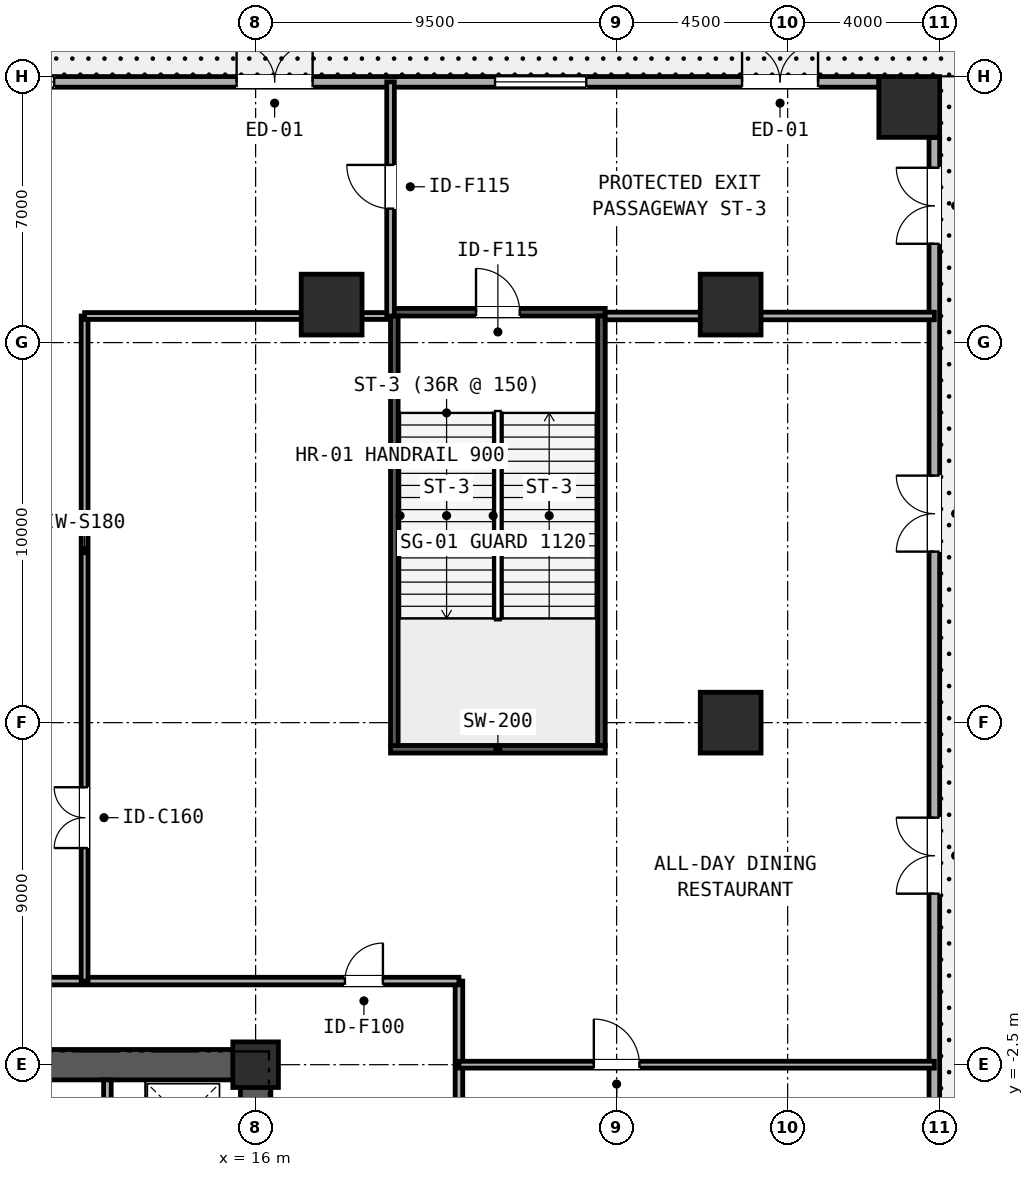
"""IFC4 building model, lengths in metres.
Left out: names, types, materials, properties, quantities, classifications, styles, units other than length and angle.
Written with IfcOpenShell. Run it as: python <this file> out.ifc"""

import sys

from ifc_helpers import new_model, si_unit, direction, frame, frame_2d, origin, origin_2d, place, context, subcontext, project, spatial, rectangle, extrude, element, fill, save


model = new_model("IFC4")
c1 = context("Model", 3, precision=1e-05, world=origin(), true_north=direction((0.0, 1.0)))
c2 = subcontext(c1, "Body", "Model", "MODEL_VIEW")
j1 = project(units=[si_unit("LENGTHUNIT", "METRE"), si_unit("PLANEANGLEUNIT", "RADIAN")], contexts=[c1])
p1 = place(None, origin())
s1 = spatial("IfcSite", under=j1, at=p1, CompositionType="ELEMENT")
p2 = place(p1, origin())
s2 = spatial("IfcBuilding", under=s1, at=p2, CompositionType="ELEMENT")
p3 = place(p2, origin())
s3 = spatial("IfcBuildingStorey", under=s2, at=p3, CompositionType="ELEMENT", Elevation=0.0)
p4 = place(p3, frame((-16.4, -2.5, 0.0), z_axis=(0.0, 0.0, 1.0), x_axis=(1.0, 0.0, 0.0)))
e1 = element("IfcWall", 1, at=p4, inside=s3, PredefinedType="SHEAR", context=c2, shape_type="SweptSolid", body=[
    extrude(rectangle(XDim=32.8, YDim=0.8, at=frame_2d((16.4, 0.0))), origin(), (0.0, 0.0, 1.0), 4.82),
])
p5 = place(p4, frame((6.025, 0.0, 0.0)))
e2 = element("IfcOpeningElement", 2, at=p5, cuts=e1, PredefinedType="OPENING", context=c2, shape_type="SweptSolid", body=[
    extrude(rectangle(XDim=1.15, YDim=2.0, at=frame_2d((0.575, 1.0))), frame((0.0, 0.41, 0.0), z_axis=(0.0, -1.0, 0.0), x_axis=(1.0, 0.0, 0.0)), (0.0, 0.0, 1.0), 0.82),
])
p6 = place(p4, frame((15.6, 0.0, 0.0)))
e3 = element("IfcOpeningElement", 3, at=p6, cuts=e1, PredefinedType="OPENING", context=c2, shape_type="SweptSolid", body=[
    extrude(rectangle(XDim=1.6, YDim=2.0, at=frame_2d((0.8, 1.0))), frame((0.0, 0.41, 0.0), z_axis=(0.0, -1.0, 0.0), x_axis=(1.0, 0.0, 0.0)), (0.0, 0.0, 1.0), 0.82),
])
p7 = place(p4, frame((25.625, 0.0, 0.0)))
e4 = element("IfcOpeningElement", 4, at=p7, cuts=e1, PredefinedType="OPENING", context=c2, shape_type="SweptSolid", body=[
    extrude(rectangle(XDim=1.15, YDim=2.0, at=frame_2d((0.575, 1.0))), frame((0.0, 0.41, 0.0), z_axis=(0.0, -1.0, 0.0), x_axis=(1.0, 0.0, 0.0)), (0.0, 0.0, 1.0), 0.82),
])
p8 = place(p3, frame((16.0, -12.6, 0.0), z_axis=(0.0, 0.0, 1.0), x_axis=(0.0, 1.0, 0.0)))
e5 = element("IfcWall", 5, at=p8, inside=s3, PredefinedType="SHEAR", context=c2, shape_type="SweptSolid", body=[
    extrude(rectangle(XDim=9.7, YDim=0.8, at=frame_2d((4.85, 0.0))), origin(), (0.0, 0.0, 1.0), 4.82),
])
p9 = place(p3, frame((19.55, 5.8, 0.0), z_axis=(0.0, 0.0, 1.0), x_axis=(1.0, 0.0, 0.0)))
e6 = element("IfcWall", 6, at=p9, inside=s3, PredefinedType="SOLIDWALL", context=c2, shape_type="SweptSolid", body=[
    extrude(rectangle(XDim=5.65, YDim=0.2, at=frame_2d((2.825, 0.0))), origin(), (0.0, 0.0, 1.0), 5.1),
])
p10 = place(p3, frame((19.55, 17.3, 0.0), z_axis=(0.0, 0.0, 1.0), x_axis=(1.0, 0.0, 0.0)))
e7 = element("IfcWall", 7, at=p10, inside=s3, PredefinedType="SOLIDWALL", context=c2, shape_type="SweptSolid", body=[
    extrude(rectangle(XDim=5.65, YDim=0.2, at=frame_2d((2.825, 0.0))), origin(), (0.0, 0.0, 1.0), 5.1),
])
p11 = place(p10, frame((2.25, 0.0, 0.0)))
e8 = element("IfcOpeningElement", 8, at=p11, cuts=e7, PredefinedType="OPENING", context=c2, shape_type="SweptSolid", body=[
    extrude(rectangle(XDim=1.15, YDim=2.2, at=frame_2d((0.575, 1.1))), frame((0.0, 0.11, 0.0), z_axis=(0.0, -1.0, 0.0), x_axis=(1.0, 0.0, 0.0)), (0.0, 0.0, 1.0), 0.22),
])
for number, where, z_axis, x_axis in (
    (9, (19.65, 5.9, 0.0), (0.0, 0.0, 1.0), (0.0, 1.0, 0.0)),
    (10, (25.1, 5.9, 0.0), (0.0, 0.0, 1.0), (0.0, 1.0, 0.0)),
):
    element("IfcWall", number, at=place(p3, frame(where, z_axis=z_axis, x_axis=x_axis)), inside=s3, PredefinedType="SOLIDWALL", context=c2, shape_type="SweptSolid", body=[
        extrude(rectangle(XDim=11.3, YDim=0.2, at=frame_2d((5.65, 0.0))), origin(), (0.0, 0.0, 1.0), 5.1),
    ])
p12 = place(p3, frame((16.0, -2.5, 0.0), z_axis=(0.0, 0.0, 1.0), x_axis=(1.0, 0.0, 0.0)))
e11 = element("IfcColumn", 11, at=p12, inside=s3, PredefinedType="COLUMN", context=c2, shape_type="SweptSolid", body=[
    extrude(rectangle(XDim=1.2, YDim=1.2, at=origin_2d()), origin(), (0.0, 0.0, 1.0), 5.4),
])
for number, where, z_axis, x_axis in (
    (12, (33.2, 22.7, 0.0), (0.0, 0.0, 1.0), (1.0, 0.0, 0.0)),
    (13, (28.5, 6.5, 0.0), (0.0, 0.0, 1.0), (1.0, 0.0, 0.0)),
    (14, (18.0, 17.5, 0.0), (0.0, 0.0, 1.0), (1.0, 0.0, 0.0)),
    (15, (28.5, 17.5, 0.0), (0.0, 0.0, 1.0), (1.0, 0.0, 0.0)),
):
    element("IfcColumn", number, at=place(p3, frame(where, z_axis=z_axis, x_axis=x_axis)), inside=s3, PredefinedType="COLUMN", context=c2, shape_type="SweptSolid", body=[
        extrude(rectangle(XDim=1.6, YDim=1.6, at=origin_2d()), origin(), (0.0, 0.0, 1.0), 5.4),
    ])
p13 = place(p3, frame((-32.4, 23.36, 0.0), z_axis=(0.0, 0.0, 1.0), x_axis=(1.0, 0.0, 0.0)))
e16 = element("IfcWall", 16, at=p13, inside=s3, PredefinedType="STANDARD", context=c2, shape_type="SweptSolid", body=[
    extrude(rectangle(XDim=64.8, YDim=0.28, at=frame_2d((32.4, 0.0))), origin(), (0.0, 0.0, 1.0), 5.1),
])
p14 = place(p13, frame((8.6, 0.0, 0.0)))
e17 = element("IfcOpeningElement", 17, at=p14, cuts=e16, PredefinedType="OPENING", context=c2, shape_type="SweptSolid", body=[
    extrude(rectangle(XDim=2.0, YDim=2.35, at=frame_2d((1.0, 1.175))), frame((0.0, 0.15, 0.0), z_axis=(0.0, -1.0, 0.0), x_axis=(1.0, 0.0, 0.0)), (0.0, 0.0, 1.0), 0.3),
])
p15 = place(p13, frame((26.9, 0.0, 0.0)))
e18 = element("IfcOpeningElement", 18, at=p15, cuts=e16, PredefinedType="OPENING", context=c2, shape_type="SweptSolid", body=[
    extrude(rectangle(XDim=2.0, YDim=2.35, at=frame_2d((1.0, 1.175))), frame((0.0, 0.15, 0.0), z_axis=(0.0, -1.0, 0.0), x_axis=(1.0, 0.0, 0.0)), (0.0, 0.0, 1.0), 0.3),
])
p16 = place(p13, frame((35.9, 0.0, 0.0)))
e19 = element("IfcOpeningElement", 19, at=p16, cuts=e16, PredefinedType="OPENING", context=c2, shape_type="SweptSolid", body=[
    extrude(rectangle(XDim=2.0, YDim=2.35, at=frame_2d((1.0, 1.175))), frame((0.0, 0.15, 0.0), z_axis=(0.0, -1.0, 0.0), x_axis=(1.0, 0.0, 0.0)), (0.0, 0.0, 1.0), 0.3),
])
p17 = place(p13, frame((47.9, 0.0, 0.0)))
e20 = element("IfcOpeningElement", 20, at=p17, cuts=e16, PredefinedType="OPENING", context=c2, shape_type="SweptSolid", body=[
    extrude(rectangle(XDim=2.0, YDim=2.35, at=frame_2d((1.0, 1.175))), frame((0.0, 0.15, 0.0), z_axis=(0.0, -1.0, 0.0), x_axis=(1.0, 0.0, 0.0)), (0.0, 0.0, 1.0), 0.3),
])
p18 = place(p13, frame((61.2, 0.0, 0.0)))
e21 = element("IfcOpeningElement", 21, at=p18, cuts=e16, PredefinedType="OPENING", context=c2, shape_type="SweptSolid", body=[
    extrude(rectangle(XDim=2.0, YDim=2.35, at=frame_2d((1.0, 1.175))), frame((0.0, 0.15, 0.0), z_axis=(0.0, -1.0, 0.0), x_axis=(1.0, 0.0, 0.0)), (0.0, 0.0, 1.0), 0.3),
])
p19 = place(p13, frame((0.3, 0.0, 0.0)))
e22 = element("IfcOpeningElement", 22, at=p19, cuts=e16, PredefinedType="OPENING", context=c2, shape_type="SweptSolid", body=[
    extrude(rectangle(XDim=5.2, YDim=3.1, at=frame_2d((2.6, 1.55))), frame((0.0, 0.15, 0.0), z_axis=(0.0, -1.0, 0.0), x_axis=(1.0, 0.0, 0.0)), (0.0, 0.0, 1.0), 0.3),
])
p20 = place(p13, frame((16.2, 0.0, 0.85)))
e23 = element("IfcOpeningElement", 23, at=p20, cuts=e16, PredefinedType="OPENING", context=c2, shape_type="SweptSolid", body=[
    extrude(rectangle(XDim=2.4, YDim=2.1, at=frame_2d((1.2, 1.05))), frame((0.0, 0.15, 0.0), z_axis=(0.0, -1.0, 0.0), x_axis=(1.0, 0.0, 0.0)), (0.0, 0.0, 1.0), 0.3),
])
p21 = place(p13, frame((31.2, 0.0, 0.85)))
e24 = element("IfcOpeningElement", 24, at=p21, cuts=e16, PredefinedType="OPENING", context=c2, shape_type="SweptSolid", body=[
    extrude(rectangle(XDim=2.4, YDim=2.1, at=frame_2d((1.2, 1.05))), frame((0.0, 0.15, 0.0), z_axis=(0.0, -1.0, 0.0), x_axis=(1.0, 0.0, 0.0)), (0.0, 0.0, 1.0), 0.3),
])
p22 = place(p13, frame((40.7, 0.0, 0.85)))
e25 = element("IfcOpeningElement", 25, at=p22, cuts=e16, PredefinedType="OPENING", context=c2, shape_type="SweptSolid", body=[
    extrude(rectangle(XDim=2.4, YDim=2.1, at=frame_2d((1.2, 1.05))), frame((0.0, 0.15, 0.0), z_axis=(0.0, -1.0, 0.0), x_axis=(1.0, 0.0, 0.0)), (0.0, 0.0, 1.0), 0.3),
])
p23 = place(p13, frame((54.7, 0.0, 0.85)))
e26 = element("IfcOpeningElement", 26, at=p23, cuts=e16, PredefinedType="OPENING", context=c2, shape_type="SweptSolid", body=[
    extrude(rectangle(XDim=2.4, YDim=2.1, at=frame_2d((1.2, 1.05))), frame((0.0, 0.15, 0.0), z_axis=(0.0, -1.0, 0.0), x_axis=(1.0, 0.0, 0.0)), (0.0, 0.0, 1.0), 0.3),
])
p24 = place(p3, frame((33.86, -21.9, 0.0), z_axis=(0.0, 0.0, 1.0), x_axis=(0.0, 1.0, 0.0)))
e27 = element("IfcWall", 27, at=p24, inside=s3, PredefinedType="STANDARD", context=c2, shape_type="SweptSolid", body=[
    extrude(rectangle(XDim=43.8, YDim=0.28, at=frame_2d((21.9, 0.0))), origin(), (0.0, 0.0, 1.0), 5.1),
])
p25 = place(p24, frame((23.9, 0.0, 0.0)))
e28 = element("IfcOpeningElement", 28, at=p25, cuts=e27, PredefinedType="OPENING", context=c2, shape_type="SweptSolid", body=[
    extrude(rectangle(XDim=2.0, YDim=2.35, at=frame_2d((1.0, 1.175))), frame((0.0, 0.15, 0.0), z_axis=(0.0, -1.0, 0.0), x_axis=(1.0, 0.0, 0.0)), (0.0, 0.0, 1.0), 0.3),
])
p26 = place(p24, frame((32.9, 0.0, 0.0)))
e29 = element("IfcOpeningElement", 29, at=p26, cuts=e27, PredefinedType="OPENING", context=c2, shape_type="SweptSolid", body=[
    extrude(rectangle(XDim=2.0, YDim=2.35, at=frame_2d((1.0, 1.175))), frame((0.0, 0.15, 0.0), z_axis=(0.0, -1.0, 0.0), x_axis=(1.0, 0.0, 0.0)), (0.0, 0.0, 1.0), 0.3),
])
p27 = place(p24, frame((41.0, 0.0, 0.0)))
e30 = element("IfcOpeningElement", 30, at=p27, cuts=e27, PredefinedType="OPENING", context=c2, shape_type="SweptSolid", body=[
    extrude(rectangle(XDim=2.0, YDim=2.35, at=frame_2d((1.0, 1.175))), frame((0.0, 0.15, 0.0), z_axis=(0.0, -1.0, 0.0), x_axis=(1.0, 0.0, 0.0)), (0.0, 0.0, 1.0), 0.3),
])
p28 = place(p3, frame((12.1, -5.2, 0.0), z_axis=(0.0, 0.0, 1.0), x_axis=(0.0, 1.0, 0.0)))
e31 = element("IfcWall", 31, at=p28, inside=s3, PredefinedType="PARTITIONING", context=c2, shape_type="SweptSolid", body=[
    extrude(rectangle(XDim=2.3, YDim=0.2, at=frame_2d((1.15, 0.0))), origin(), (0.0, 0.0, 1.0), 5.1),
])
p29 = place(p28, frame((0.825, 0.0, 0.0)))
e32 = element("IfcOpeningElement", 32, at=p29, cuts=e31, PredefinedType="OPENING", context=c2, shape_type="SweptSolid", body=[
    extrude(rectangle(XDim=0.85, YDim=2.05, at=frame_2d((0.425, 1.025))), frame((0.0, 0.11, 0.0), z_axis=(0.0, -1.0, 0.0), x_axis=(1.0, 0.0, 0.0)), (0.0, 0.0, 1.0), 0.22),
])
p30 = place(p3, frame((21.35, -23.36, 0.0), z_axis=(0.0, 0.0, 1.0), x_axis=(0.0, 1.0, 0.0)))
e33 = element("IfcWall", 33, at=p30, inside=s3, PredefinedType="PARTITIONING", context=c2, shape_type="SweptSolid", body=[
    extrude(rectangle(XDim=23.06, YDim=0.2, at=frame_2d((11.53, 0.0))), origin(), (0.0, 0.0, 1.0), 4.229),
])
p31 = place(p30, frame((14.86, 0.0, 0.0)))
e34 = element("IfcOpeningElement", 34, at=p31, cuts=e33, PredefinedType="OPENING", context=c2, shape_type="SweptSolid", body=[
    extrude(rectangle(XDim=1.0, YDim=2.1, at=frame_2d((0.5, 1.05))), frame((0.0, 0.11, 0.0), z_axis=(0.0, -1.0, 0.0), x_axis=(1.0, 0.0, 0.0)), (0.0, 0.0, 1.0), 0.22),
])
p32 = place(p3, frame((8.05, -0.3, 0.0), z_axis=(0.0, 0.0, 1.0), x_axis=(1.0, 0.0, 0.0)))
e35 = element("IfcWall", 35, at=p32, inside=s3, PredefinedType="PARTITIONING", context=c2, shape_type="SweptSolid", body=[
    extrude(rectangle(XDim=13.3, YDim=0.2, at=frame_2d((6.65, 0.0))), origin(), (0.0, 0.0, 1.0), 4.229),
])
p33 = place(p32, frame((10.3, 0.0, 0.0)))
e36 = element("IfcOpeningElement", 36, at=p33, cuts=e35, PredefinedType="OPENING", context=c2, shape_type="SweptSolid", body=[
    extrude(rectangle(XDim=1.0, YDim=2.1, at=frame_2d((0.5, 1.05))), frame((0.0, 0.11, 0.0), z_axis=(0.0, -1.0, 0.0), x_axis=(1.0, 0.0, 0.0)), (0.0, 0.0, 1.0), 0.22),
])
p34 = place(p3, frame((11.5, -0.3, 0.0), z_axis=(0.0, 0.0, 1.0), x_axis=(0.0, 1.0, 0.0)))
e37 = element("IfcWall", 37, at=p34, inside=s3, PredefinedType="PARTITIONING", context=c2, shape_type="SweptSolid", body=[
    extrude(rectangle(XDim=17.5, YDim=0.18, at=frame_2d((8.75, 0.0))), origin(), (0.0, 0.0, 1.0), 4.229),
])
p35 = place(p34, frame((3.5, 0.0, 0.0)))
e38 = element("IfcOpeningElement", 38, at=p35, cuts=e37, PredefinedType="OPENING", context=c2, shape_type="SweptSolid", body=[
    extrude(rectangle(XDim=1.6, YDim=2.2, at=frame_2d((0.8, 1.1))), frame((0.0, 0.1, 0.0), z_axis=(0.0, -1.0, 0.0), x_axis=(1.0, 0.0, 0.0)), (0.0, 0.0, 1.0), 0.2),
])
p36 = place(p3, frame((21.35, -2.5, 0.0), z_axis=(0.0, 0.0, 1.0), x_axis=(1.0, 0.0, 0.0)))
e39 = element("IfcWall", 39, at=p36, inside=s3, PredefinedType="PARTITIONING", context=c2, shape_type="SweptSolid", body=[
    extrude(rectangle(XDim=12.51, YDim=0.18, at=frame_2d((6.255, 0.0))), origin(), (0.0, 0.0, 1.0), 4.229),
])
p37 = place(p36, frame((3.55, 0.0, 0.0)))
e40 = element("IfcOpeningElement", 40, at=p37, cuts=e39, PredefinedType="OPENING", context=c2, shape_type="SweptSolid", body=[
    extrude(rectangle(XDim=1.2, YDim=2.2, at=frame_2d((0.6, 1.1))), frame((0.0, 0.1, 0.0), z_axis=(0.0, -1.0, 0.0), x_axis=(1.0, 0.0, 0.0)), (0.0, 0.0, 1.0), 0.2),
])
p38 = place(p3, frame((11.5, 17.2, 0.0), z_axis=(0.0, 0.0, 1.0), x_axis=(1.0, 0.0, 0.0)))
e41 = element("IfcWall", 41, at=p38, inside=s3, PredefinedType="PARTITIONING", context=c2, shape_type="SweptSolid", body=[
    extrude(rectangle(XDim=8.05, YDim=0.18, at=frame_2d((4.025, 0.0))), origin(), (0.0, 0.0, 1.0), 4.312),
])
p39 = place(p3, frame((25.2, 17.2, 0.0), z_axis=(0.0, 0.0, 1.0), x_axis=(1.0, 0.0, 0.0)))
e42 = element("IfcWall", 42, at=p39, inside=s3, PredefinedType="PARTITIONING", context=c2, shape_type="SweptSolid", body=[
    extrude(rectangle(XDim=8.66, YDim=0.2, at=frame_2d((4.33, 0.0))), origin(), (0.0, 0.0, 1.0), 4.229),
])
p40 = place(p3, frame((19.55, 17.2, 0.0), z_axis=(0.0, 0.0, 1.0), x_axis=(0.0, 1.0, 0.0)))
e43 = element("IfcWall", 43, at=p40, inside=s3, PredefinedType="PARTITIONING", context=c2, shape_type="SweptSolid", body=[
    extrude(rectangle(XDim=6.16, YDim=0.2, at=frame_2d((3.08, 0.0))), origin(), (0.0, 0.0, 1.0), 4.312),
])
p41 = place(p40, frame((2.825, 0.0, 0.0)))
e44 = element("IfcOpeningElement", 44, at=p41, cuts=e43, PredefinedType="OPENING", context=c2, shape_type="SweptSolid", body=[
    extrude(rectangle(XDim=1.15, YDim=2.2, at=frame_2d((0.575, 1.1))), frame((0.0, 0.11, 0.0), z_axis=(0.0, -1.0, 0.0), x_axis=(1.0, 0.0, 0.0)), (0.0, 0.0, 1.0), 0.22),
])
p42 = place(p17, origin())
e45 = element("IfcDoor", 45, at=p42, inside=s3, OperationType="DOUBLE_DOOR_SINGLE_SWING", PredefinedType="DOOR", context=c2, shape_type="SweptSolid", body=[
    extrude(rectangle(XDim=2.0, YDim=2.35, at=frame_2d((1.0, 1.175))), frame((0.0, 0.025, 0.0), z_axis=(0.0, -1.0, 0.0), x_axis=(1.0, 0.0, 0.0)), (0.0, 0.0, 1.0), 0.05),
])
fill(e20, e45)
p43 = place(p18, origin())
e46 = element("IfcDoor", 46, at=p43, inside=s3, OperationType="DOUBLE_DOOR_SINGLE_SWING", PredefinedType="DOOR", context=c2, shape_type="SweptSolid", body=[
    extrude(rectangle(XDim=2.0, YDim=2.35, at=frame_2d((1.0, 1.175))), frame((0.0, 0.025, 0.0), z_axis=(0.0, -1.0, 0.0), x_axis=(1.0, 0.0, 0.0)), (0.0, 0.0, 1.0), 0.05),
])
fill(e21, e46)
p44 = place(p25, frame((2.0, 0.0, 0.0), z_axis=(0.0, 0.0, 1.0), x_axis=(-1.0, 0.0, 0.0)))
e47 = element("IfcDoor", 47, at=p44, inside=s3, OperationType="DOUBLE_DOOR_SINGLE_SWING", PredefinedType="DOOR", context=c2, shape_type="SweptSolid", body=[
    extrude(rectangle(XDim=2.0, YDim=2.35, at=frame_2d((1.0, 1.175))), frame((0.0, 0.025, 0.0), z_axis=(0.0, -1.0, 0.0), x_axis=(1.0, 0.0, 0.0)), (0.0, 0.0, 1.0), 0.05),
])
fill(e28, e47)
p45 = place(p26, frame((2.0, 0.0, 0.0), z_axis=(0.0, 0.0, 1.0), x_axis=(-1.0, 0.0, 0.0)))
e48 = element("IfcDoor", 48, at=p45, inside=s3, OperationType="DOUBLE_DOOR_SINGLE_SWING", PredefinedType="DOOR", context=c2, shape_type="SweptSolid", body=[
    extrude(rectangle(XDim=2.0, YDim=2.35, at=frame_2d((1.0, 1.175))), frame((0.0, 0.025, 0.0), z_axis=(0.0, -1.0, 0.0), x_axis=(1.0, 0.0, 0.0)), (0.0, 0.0, 1.0), 0.05),
])
fill(e29, e48)
p46 = place(p27, frame((2.0, 0.0, 0.0), z_axis=(0.0, 0.0, 1.0), x_axis=(-1.0, 0.0, 0.0)))
e49 = element("IfcDoor", 49, at=p46, inside=s3, OperationType="DOUBLE_DOOR_SINGLE_SWING", PredefinedType="DOOR", context=c2, shape_type="SweptSolid", body=[
    extrude(rectangle(XDim=2.0, YDim=2.35, at=frame_2d((1.0, 1.175))), frame((0.0, 0.025, 0.0), z_axis=(0.0, -1.0, 0.0), x_axis=(1.0, 0.0, 0.0)), (0.0, 0.0, 1.0), 0.05),
])
fill(e30, e49)
p47 = place(p22, origin())
e50 = element("IfcWindow", 50, at=p47, inside=s3, PartitioningType="SINGLE_PANEL", PredefinedType="WINDOW", context=c2, shape_type="SweptSolid", body=[
    extrude(rectangle(XDim=2.4, YDim=2.1, at=frame_2d((1.2, 1.05))), frame((0.0, 0.03, 0.0), z_axis=(0.0, -1.0, 0.0), x_axis=(1.0, 0.0, 0.0)), (0.0, 0.0, 1.0), 0.06),
])
fill(e25, e50)
p48 = place(p23, origin())
e51 = element("IfcWindow", 51, at=p48, inside=s3, PartitioningType="SINGLE_PANEL", PredefinedType="WINDOW", context=c2, shape_type="SweptSolid", body=[
    extrude(rectangle(XDim=2.4, YDim=2.1, at=frame_2d((1.2, 1.05))), frame((0.0, 0.03, 0.0), z_axis=(0.0, -1.0, 0.0), x_axis=(1.0, 0.0, 0.0)), (0.0, 0.0, 1.0), 0.06),
])
fill(e26, e51)
p49 = place(p11, origin())
e52 = element("IfcDoor", 52, at=p49, inside=s3, OperationType="SINGLE_SWING_LEFT", PredefinedType="DOOR", context=c2, shape_type="SweptSolid", body=[
    extrude(rectangle(XDim=1.15, YDim=2.2, at=frame_2d((0.575, 1.1))), frame((0.0, 0.025, 0.0), z_axis=(0.0, -1.0, 0.0), x_axis=(1.0, 0.0, 0.0)), (0.0, 0.0, 1.0), 0.05),
])
fill(e8, e52)
p50 = place(p33, frame((1.0, 0.0, 0.0), z_axis=(0.0, 0.0, 1.0), x_axis=(-1.0, 0.0, 0.0)))
e53 = element("IfcDoor", 53, at=p50, inside=s3, OperationType="SINGLE_SWING_RIGHT", PredefinedType="DOOR", context=c2, shape_type="SweptSolid", body=[
    extrude(rectangle(XDim=1.0, YDim=2.1, at=frame_2d((0.5, 1.05))), frame((0.0, 0.025, 0.0), z_axis=(0.0, -1.0, 0.0), x_axis=(1.0, 0.0, 0.0)), (0.0, 0.0, 1.0), 0.05),
])
fill(e36, e53)
p51 = place(p41, origin())
e54 = element("IfcDoor", 54, at=p51, inside=s3, OperationType="SINGLE_SWING_RIGHT", PredefinedType="DOOR", context=c2, shape_type="SweptSolid", body=[
    extrude(rectangle(XDim=1.15, YDim=2.2, at=frame_2d((0.575, 1.1))), frame((0.0, 0.025, 0.0), z_axis=(0.0, -1.0, 0.0), x_axis=(1.0, 0.0, 0.0)), (0.0, 0.0, 1.0), 0.05),
])
fill(e44, e54)
p52 = place(p35, origin())
e55 = element("IfcDoor", 55, at=p52, inside=s3, OperationType="DOUBLE_DOOR_SINGLE_SWING", PredefinedType="DOOR", context=c2, shape_type="SweptSolid", body=[
    extrude(rectangle(XDim=1.6, YDim=2.2, at=frame_2d((0.8, 1.1))), frame((0.0, 0.025, 0.0), z_axis=(0.0, -1.0, 0.0), x_axis=(1.0, 0.0, 0.0)), (0.0, 0.0, 1.0), 0.05),
])
fill(e38, e55)
p53 = place(p37, origin())
e56 = element("IfcDoor", 56, at=p53, inside=s3, OperationType="SINGLE_SWING_LEFT", PredefinedType="DOOR", context=c2, shape_type="SweptSolid", body=[
    extrude(rectangle(XDim=1.2, YDim=2.2, at=frame_2d((0.6, 1.1))), frame((0.0, 0.025, 0.0), z_axis=(0.0, -1.0, 0.0), x_axis=(1.0, 0.0, 0.0)), (0.0, 0.0, 1.0), 0.05),
])
fill(e40, e56)
save(model, sys.argv[1])
